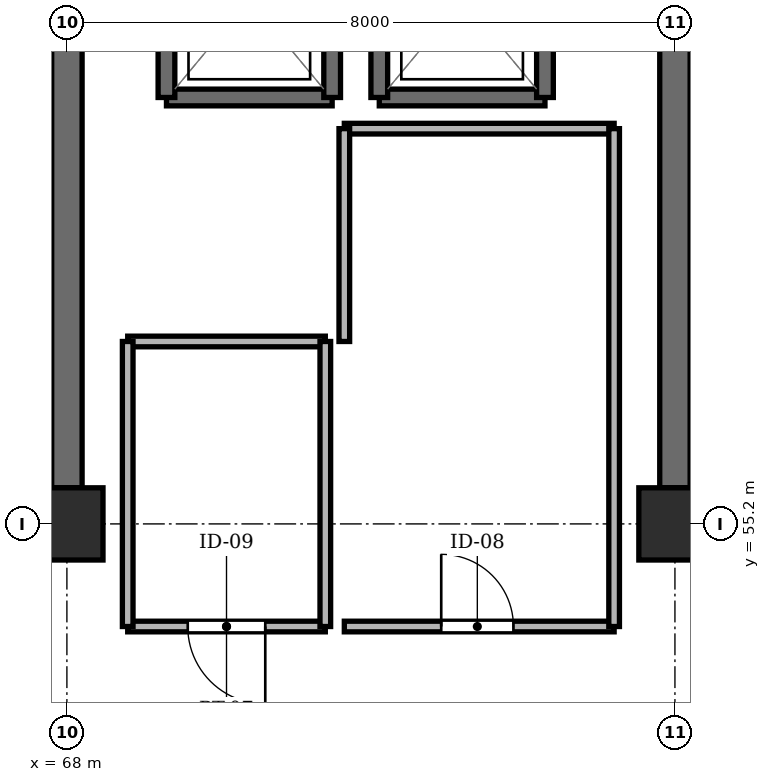
"""IFC4 building model, lengths in metres.
Left out: names, types, materials, properties, quantities, classifications, styles, units other than length and angle.
Written with IfcOpenShell. Run it as: python <this file> out.ifc"""

import sys

from ifc_helpers import new_model, si_unit, direction, frame, frame_2d, origin, origin_2d, place, context, subcontext, project, spatial, rectangle, extrude, element, fill, save


model = new_model("IFC4")
c1 = context("Model", 3, precision=1e-05, world=origin(), true_north=direction((0.0, 1.0)))
c2 = subcontext(c1, "Body", "Model", "MODEL_VIEW")
j1 = project(units=[si_unit("LENGTHUNIT", "METRE"), si_unit("PLANEANGLEUNIT", "RADIAN")], contexts=[c1])
p1 = place(None, origin())
s1 = spatial("IfcSite", under=j1, at=p1, CompositionType="ELEMENT")
p2 = place(p1, origin())
s2 = spatial("IfcBuilding", under=s1, at=p2, CompositionType="ELEMENT")
p3 = place(p2, frame((0.0, 0.0, 40.55)))
s3 = spatial("IfcBuildingStorey", under=s2, at=p3, CompositionType="ELEMENT", Elevation=40.55)
for number, where, z_axis, x_axis in (
    (1, (68.0, 55.2, -0.24), (0.0, 0.0, 1.0), (1.0, 0.0, 0.0)),
    (2, (76.0, 55.2, -0.24), (0.0, 0.0, 1.0), (1.0, 0.0, 0.0)),
):
    element("IfcColumn", number, at=place(p3, frame(where, z_axis=z_axis, x_axis=x_axis)), inside=s3, PredefinedType="COLUMN", context=c2, shape_type="SweptSolid", body=[
        extrude(rectangle(XDim=0.95, YDim=0.95, at=origin_2d()), origin(), (0.0, 0.0, 1.0), 3.25),
    ])
for number, where, z_axis, x_axis in (
    (3, (68.0, 55.675, 0.0), (0.0, 0.0, 1.0), (0.0, 1.0, 0.0)),
    (4, (76.0, 55.675, 0.0), (0.0, 0.0, 1.0), (0.0, 1.0, 0.0)),
):
    element("IfcWall", number, at=place(p3, frame(where, z_axis=z_axis, x_axis=x_axis)), inside=s3, PredefinedType="SHEAR", context=c2, shape_type="SweptSolid", body=[
        extrude(rectangle(XDim=6.325, YDim=0.4, at=frame_2d((3.163, 0.0))), origin(), (0.0, 0.0, 1.0), 3.01),
    ])
p4 = place(p3, frame((69.31, 60.81, 0.0), z_axis=(0.0, 0.0, 1.0), x_axis=(1.0, 0.0, 0.0)))
e5 = element("IfcWall", 5, at=p4, inside=s3, PredefinedType="SHEAR", context=c2, shape_type="SweptSolid", body=[
    extrude(rectangle(XDim=2.18, YDim=0.22, at=frame_2d((1.09, 0.0))), origin(), (0.0, 0.0, 1.0), 3.01),
])
for number, where, z_axis, x_axis in (
    (6, (69.31, 63.39, 0.0), (0.0, 0.0, 1.0), (0.0, -1.0, 0.0)),
    (7, (71.49, 60.81, 0.0), (0.0, 0.0, 1.0), (0.0, 1.0, 0.0)),
):
    element("IfcWall", number, at=place(p3, frame(where, z_axis=z_axis, x_axis=x_axis)), inside=s3, PredefinedType="SHEAR", context=c2, shape_type="SweptSolid", body=[
        extrude(rectangle(XDim=2.58, YDim=0.22, at=frame_2d((1.29, 0.0))), origin(), (0.0, 0.0, 1.0), 3.01),
    ])
p5 = place(p3, frame((72.11, 60.81, 0.0), z_axis=(0.0, 0.0, 1.0), x_axis=(1.0, 0.0, 0.0)))
e8 = element("IfcWall", 8, at=p5, inside=s3, PredefinedType="SHEAR", context=c2, shape_type="SweptSolid", body=[
    extrude(rectangle(XDim=2.18, YDim=0.22, at=frame_2d((1.09, 0.0))), origin(), (0.0, 0.0, 1.0), 3.01),
])
for number, where, z_axis, x_axis in (
    (9, (72.11, 63.39, 0.0), (0.0, 0.0, 1.0), (0.0, -1.0, 0.0)),
    (10, (74.29, 60.81, 0.0), (0.0, 0.0, 1.0), (0.0, 1.0, 0.0)),
):
    element("IfcWall", number, at=place(p3, frame(where, z_axis=z_axis, x_axis=x_axis)), inside=s3, PredefinedType="SHEAR", context=c2, shape_type="SweptSolid", body=[
        extrude(rectangle(XDim=2.58, YDim=0.22, at=frame_2d((1.29, 0.0))), origin(), (0.0, 0.0, 1.0), 3.01),
    ])
p6 = place(p3, frame((68.8, 53.85, 0.0), z_axis=(0.0, 0.0, 1.0), x_axis=(1.0, 0.0, 0.0)))
e11 = element("IfcWall", 11, at=p6, inside=s3, PredefinedType="PARTITIONING", context=c2, shape_type="SweptSolid", body=[
    extrude(rectangle(XDim=2.6, YDim=0.14, at=frame_2d((1.3, 0.0))), origin(), (0.0, 0.0, 1.0), 2.53),
])
p7 = place(p6, frame((0.79, 0.0, 0.0)))
e12 = element("IfcOpeningElement", 12, at=p7, cuts=e11, PredefinedType="OPENING", context=c2, shape_type="SweptSolid", body=[
    extrude(rectangle(XDim=1.02, YDim=2.1, at=frame_2d((0.51, 1.05))), frame((0.0, 0.082, 0.0), z_axis=(0.0, -1.0, 0.0), x_axis=(1.0, 0.0, 0.0)), (0.0, 0.0, 1.0), 0.164),
])
p8 = place(p3, frame((68.8, 57.6, 0.0), z_axis=(0.0, 0.0, 1.0), x_axis=(1.0, 0.0, 0.0)))
e13 = element("IfcWall", 13, at=p8, inside=s3, PredefinedType="PARTITIONING", context=c2, shape_type="SweptSolid", body=[
    extrude(rectangle(XDim=2.6, YDim=0.14, at=frame_2d((1.3, 0.0))), origin(), (0.0, 0.0, 1.0), 2.53),
])
for number, where, z_axis, x_axis in (
    (14, (68.8, 53.85, 0.0), (0.0, 0.0, 1.0), (0.0, 1.0, 0.0)),
    (15, (71.4, 53.85, 0.0), (0.0, 0.0, 1.0), (0.0, 1.0, 0.0)),
):
    element("IfcWall", number, at=place(p3, frame(where, z_axis=z_axis, x_axis=x_axis)), inside=s3, PredefinedType="PARTITIONING", context=c2, shape_type="SweptSolid", body=[
        extrude(rectangle(XDim=3.75, YDim=0.14, at=frame_2d((1.875, 0.0))), origin(), (0.0, 0.0, 1.0), 2.53),
    ])
p9 = place(p3, frame((71.65, 53.85, 0.0), z_axis=(0.0, 0.0, 1.0), x_axis=(1.0, 0.0, 0.0)))
e16 = element("IfcWall", 16, at=p9, inside=s3, PredefinedType="PARTITIONING", context=c2, shape_type="SweptSolid", body=[
    extrude(rectangle(XDim=3.55, YDim=0.14, at=frame_2d((1.775, 0.0))), origin(), (0.0, 0.0, 1.0), 2.53),
])
p10 = place(p9, frame((1.275, 0.0, 0.0)))
e17 = element("IfcOpeningElement", 17, at=p10, cuts=e16, PredefinedType="OPENING", context=c2, shape_type="SweptSolid", body=[
    extrude(rectangle(XDim=0.95, YDim=2.1, at=frame_2d((0.475, 1.05))), frame((0.0, 0.082, 0.0), z_axis=(0.0, -1.0, 0.0), x_axis=(1.0, 0.0, 0.0)), (0.0, 0.0, 1.0), 0.164),
])
p11 = place(p3, frame((71.65, 60.4, 0.0), z_axis=(0.0, 0.0, 1.0), x_axis=(1.0, 0.0, 0.0)))
e18 = element("IfcWall", 18, at=p11, inside=s3, PredefinedType="PARTITIONING", context=c2, shape_type="SweptSolid", body=[
    extrude(rectangle(XDim=3.55, YDim=0.14, at=frame_2d((1.775, 0.0))), origin(), (0.0, 0.0, 1.0), 2.53),
])
p12 = place(p3, frame((71.65, 57.6, 0.0), z_axis=(0.0, 0.0, 1.0), x_axis=(0.0, 1.0, 0.0)))
e19 = element("IfcWall", 19, at=p12, inside=s3, PredefinedType="PARTITIONING", context=c2, shape_type="SweptSolid", body=[
    extrude(rectangle(XDim=2.8, YDim=0.14, at=frame_2d((1.4, 0.0))), origin(), (0.0, 0.0, 1.0), 2.53),
])
p13 = place(p3, frame((75.2, 53.85, 0.0), z_axis=(0.0, 0.0, 1.0), x_axis=(0.0, 1.0, 0.0)))
e20 = element("IfcWall", 20, at=p13, inside=s3, PredefinedType="PARTITIONING", context=c2, shape_type="SweptSolid", body=[
    extrude(rectangle(XDim=6.55, YDim=0.14, at=frame_2d((3.275, 0.0))), origin(), (0.0, 0.0, 1.0), 2.53),
])
p14 = place(p7, frame((1.02, 0.0, 0.0), z_axis=(0.0, 0.0, 1.0), x_axis=(-1.0, 0.0, 0.0)))
e21 = element("IfcDoor", 21, at=p14, inside=s3, OperationType="SINGLE_SWING_RIGHT", PredefinedType="DOOR", context=c2, shape_type="SweptSolid", body=[
    extrude(rectangle(XDim=1.02, YDim=2.1, at=frame_2d((0.51, 1.05))), frame((0.0, 0.025, 0.0), z_axis=(0.0, -1.0, 0.0), x_axis=(1.0, 0.0, 0.0)), (0.0, 0.0, 1.0), 0.05),
])
fill(e12, e21)
p15 = place(p10, origin())
e22 = element("IfcDoor", 22, at=p15, inside=s3, OperationType="SINGLE_SWING_LEFT", PredefinedType="DOOR", context=c2, shape_type="SweptSolid", body=[
    extrude(rectangle(XDim=0.95, YDim=2.1, at=frame_2d((0.475, 1.05))), frame((0.0, 0.025, 0.0), z_axis=(0.0, -1.0, 0.0), x_axis=(1.0, 0.0, 0.0)), (0.0, 0.0, 1.0), 0.05),
])
fill(e17, e22)
save(model, sys.argv[1])
